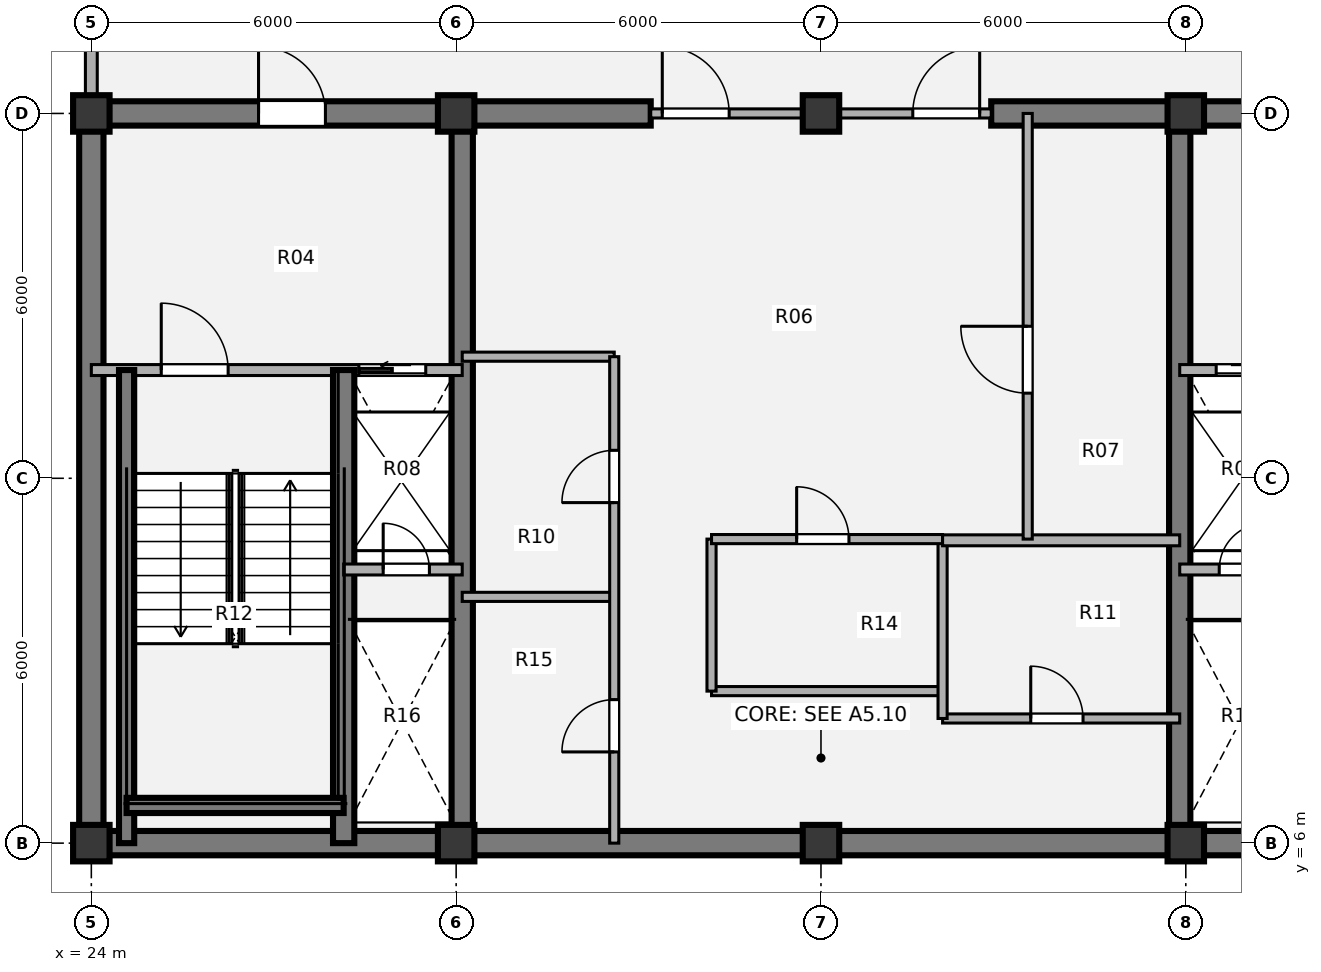
"""IFC4 building model, lengths in metres.
Left out: names, types, materials, properties, quantities, classifications, styles, units other than length and angle.
Written with IfcOpenShell. Run it as: python <this file> out.ifc"""

import sys

from ifc_helpers import new_model, si_unit, direction, frame, frame_2d, origin, origin_2d, place, context, subcontext, project, spatial, rectangle, extrude, source, transform, mapped, element, fill, save


model = new_model("IFC4")
c1 = context("Model", 3, precision=1e-05, world=origin(), true_north=direction((0.0, 1.0)))
c2 = subcontext(c1, "Body", "Model", "MODEL_VIEW")
j1 = project(units=[si_unit("LENGTHUNIT", "METRE"), si_unit("PLANEANGLEUNIT", "RADIAN")], contexts=[c1])
p1 = place(None, origin())
s1 = spatial("IfcSite", under=j1, at=p1, CompositionType="ELEMENT")
p2 = place(p1, origin())
s2 = spatial("IfcBuilding", under=s1, at=p2, CompositionType="ELEMENT")
p3 = place(p2, frame((0.0, 0.0, 311.76)))
s3 = spatial("IfcBuildingStorey", under=s2, at=p3, CompositionType="ELEMENT", Elevation=311.76)
m1 = source(origin(), c2, "Body", "SweptSolid", [
    extrude(rectangle(XDim=0.6, YDim=0.6, at=origin_2d()), origin(), (0.0, 0.0, 1.0), 3.96),
])
for number, where, z_axis, x_axis in (
    (1, (24.0, 6.0, 0.0), (0.0, 0.0, 1.0), (1.0, 0.0, 0.0)),
    (2, (30.0, 6.0, 0.0), (0.0, 0.0, 1.0), (1.0, 0.0, 0.0)),
    (3, (36.0, 6.0, 0.0), (0.0, 0.0, 1.0), (1.0, 0.0, 0.0)),
    (4, (42.0, 6.0, 0.0), (0.0, 0.0, 1.0), (1.0, 0.0, 0.0)),
    (5, (24.0, 18.0, 0.0), (0.0, 0.0, 1.0), (1.0, 0.0, 0.0)),
    (6, (30.0, 18.0, 0.0), (0.0, 0.0, 1.0), (1.0, 0.0, 0.0)),
    (7, (36.0, 18.0, 0.0), (0.0, 0.0, 1.0), (1.0, 0.0, 0.0)),
    (8, (42.0, 18.0, 0.0), (0.0, 0.0, 1.0), (1.0, 0.0, 0.0)),
):
    element("IfcColumn", number, at=place(p3, frame(where, z_axis=z_axis, x_axis=x_axis)), inside=s3, PredefinedType="COLUMN", context=c2, shape_type="MappedRepresentation", body=[
        mapped(m1, transform((0.0, 0.0, 0.0), x_axis=(1.0, 0.0, 0.0), y_axis=(0.0, 1.0, 0.0), z_axis=(0.0, 0.0, 1.0), scale=1.0)),
    ])
p4 = place(p3, frame((48.2, 6.0, 0.0), z_axis=(0.0, 0.0, 1.0), x_axis=(-1.0, 0.0, 0.0)))
e9 = element("IfcWall", 9, at=p4, inside=s3, PredefinedType="SHEAR", context=c2, shape_type="SweptSolid", body=[
    extrude(rectangle(XDim=24.4, YDim=0.4, at=frame_2d((12.2, 0.0))), origin(), (0.0, 0.0, 1.0), 3.96),
])
p5 = place(p3, frame((24.0, 6.0, 0.0), z_axis=(0.0, 0.0, 1.0), x_axis=(0.0, 1.0, 0.0)))
e10 = element("IfcWall", 10, at=p5, inside=s3, PredefinedType="SHEAR", context=c2, shape_type="SweptSolid", body=[
    extrude(rectangle(XDim=12.0, YDim=0.4, at=frame_2d((6.0, 0.0))), origin(), (0.0, 0.0, 1.0), 3.96),
])
p6 = place(p3, frame((23.8, 18.0, 0.0), z_axis=(0.0, 0.0, 1.0), x_axis=(1.0, 0.0, 0.0)))
e11 = element("IfcWall", 11, at=p6, inside=s3, PredefinedType="SHEAR", context=c2, shape_type="SweptSolid", body=[
    extrude(rectangle(XDim=9.4, YDim=0.4, at=frame_2d((4.7, 0.0))), origin(), (0.0, 0.0, 1.0), 3.96),
])
p7 = place(p6, frame((2.95, 0.0, 0.0)))
e12 = element("IfcOpeningElement", 12, at=p7, cuts=e11, PredefinedType="OPENING", context=c2, shape_type="SweptSolid", body=[
    extrude(rectangle(XDim=1.1, YDim=2.1, at=origin_2d()), frame((0.55, 0.21, 1.05), z_axis=(0.0, -1.0, 0.0), x_axis=(1.0, 0.0, 0.0)), (0.0, 0.0, 1.0), 0.42),
])
p8 = place(p3, frame((38.8, 18.0, 0.0), z_axis=(0.0, 0.0, 1.0), x_axis=(1.0, 0.0, 0.0)))
e13 = element("IfcWall", 13, at=p8, inside=s3, PredefinedType="SHEAR", context=c2, shape_type="SweptSolid", body=[
    extrude(rectangle(XDim=9.4, YDim=0.4, at=frame_2d((4.7, 0.0))), origin(), (0.0, 0.0, 1.0), 3.96),
])
p9 = place(p8, frame((5.45, 0.0, 0.0)))
e14 = element("IfcOpeningElement", 14, at=p9, cuts=e13, PredefinedType="OPENING", context=c2, shape_type="SweptSolid", body=[
    extrude(rectangle(XDim=1.1, YDim=2.1, at=origin_2d()), frame((0.55, 0.21, 1.05), z_axis=(0.0, -1.0, 0.0), x_axis=(1.0, 0.0, 0.0)), (0.0, 0.0, 1.0), 0.42),
])
for number, where, z_axis, x_axis in (
    (15, (30.1, 6.0, 0.0), (0.0, 0.0, 1.0), (0.0, 1.0, 0.0)),
    (16, (41.9, 18.0, 0.0), (0.0, 0.0, 1.0), (0.0, -1.0, 0.0)),
):
    element("IfcWall", number, at=place(p3, frame(where, z_axis=z_axis, x_axis=x_axis)), inside=s3, PredefinedType="SHEAR", context=c2, shape_type="SweptSolid", body=[
        extrude(rectangle(XDim=12.0, YDim=0.35, at=frame_2d((6.0, 0.0))), origin(), (0.0, 0.0, 1.0), 3.96),
    ])
p10 = place(p3, frame((24.0, 18.28, 0.0), z_axis=(0.0, 0.0, 1.0), x_axis=(0.0, 1.0, 0.0)))
e17 = element("IfcWall", 17, at=p10, inside=s3, PredefinedType="SOLIDWALL", context=c2, shape_type="SweptSolid", body=[
    extrude(rectangle(XDim=2.77, YDim=0.195, at=frame_2d((1.385, 0.0))), origin(), (0.0, 0.0, 1.0), 2.898),
])
p11 = place(p3, frame((30.1, 14.0, 0.0), z_axis=(0.0, 0.0, 1.0), x_axis=(1.0, 0.0, 0.0)))
e18 = element("IfcWall", 18, at=p11, inside=s3, PredefinedType="PARTITIONING", context=c2, shape_type="SweptSolid", body=[
    extrude(rectangle(XDim=2.5, YDim=0.15, at=frame_2d((1.25, 0.0))), origin(), (0.0, 0.0, 1.0), 3.68),
])
p12 = place(p3, frame((34.2, 8.5, 0.0), z_axis=(0.0, 0.0, 1.0), x_axis=(1.0, 0.0, 0.0)))
e19 = element("IfcWall", 19, at=p12, inside=s3, PredefinedType="PARTITIONING", context=c2, shape_type="SweptSolid", body=[
    extrude(rectangle(XDim=3.8, YDim=0.15, at=frame_2d((1.9, 0.0))), origin(), (0.0, 0.0, 1.0), 3.68),
])
p13 = place(p3, frame((38.0, 8.05, 0.0), z_axis=(0.0, 0.0, 1.0), x_axis=(1.0, 0.0, 0.0)))
e20 = element("IfcWall", 20, at=p13, inside=s3, PredefinedType="PARTITIONING", context=c2, shape_type="SweptSolid", body=[
    extrude(rectangle(XDim=3.9, YDim=0.15, at=frame_2d((1.95, 0.0))), origin(), (0.0, 0.0, 1.0), 3.68),
])
p14 = place(p13, frame((1.45, 0.0, 0.0)))
e21 = element("IfcOpeningElement", 21, at=p14, cuts=e20, PredefinedType="OPENING", context=c2, shape_type="SweptSolid", body=[
    extrude(rectangle(XDim=0.86, YDim=2.1, at=origin_2d()), frame((0.43, 0.085, 1.05), z_axis=(0.0, -1.0, 0.0), x_axis=(1.0, 0.0, 0.0)), (0.0, 0.0, 1.0), 0.17),
])
p15 = place(p3, frame((34.2, 8.5, 0.0), z_axis=(0.0, 0.0, 1.0), x_axis=(0.0, 1.0, 0.0)))
e22 = element("IfcWall", 22, at=p15, inside=s3, PredefinedType="PARTITIONING", context=c2, shape_type="SweptSolid", body=[
    extrude(rectangle(XDim=2.5, YDim=0.15, at=frame_2d((1.25, 0.0))), origin(), (0.0, 0.0, 1.0), 3.68),
])
p16 = place(p3, frame((38.0, 8.05, 0.0), z_axis=(0.0, 0.0, 1.0), x_axis=(0.0, 1.0, 0.0)))
e23 = element("IfcWall", 23, at=p16, inside=s3, PredefinedType="PARTITIONING", context=c2, shape_type="SweptSolid", body=[
    extrude(rectangle(XDim=2.95, YDim=0.15, at=frame_2d((1.475, 0.0))), origin(), (0.0, 0.0, 1.0), 3.68),
])
p17 = place(p3, frame((34.2, 11.0, 0.0), z_axis=(0.0, 0.0, 1.0), x_axis=(1.0, 0.0, 0.0)))
e24 = element("IfcWall", 24, at=p17, inside=s3, PredefinedType="PARTITIONING", context=c2, shape_type="SweptSolid", body=[
    extrude(rectangle(XDim=3.8, YDim=0.15, at=frame_2d((1.9, 0.0))), origin(), (0.0, 0.0, 1.0), 3.68),
])
p18 = place(p17, frame((1.4, 0.0, 0.0)))
e25 = element("IfcOpeningElement", 25, at=p18, cuts=e24, PredefinedType="OPENING", context=c2, shape_type="SweptSolid", body=[
    extrude(rectangle(XDim=0.86, YDim=2.1, at=origin_2d()), frame((0.43, 0.085, 1.05), z_axis=(0.0, -1.0, 0.0), x_axis=(1.0, 0.0, 0.0)), (0.0, 0.0, 1.0), 0.17),
])
p19 = place(p3, frame((38.0, 10.98, 0.0), z_axis=(0.0, 0.0, 1.0), x_axis=(1.0, 0.0, 0.0)))
e26 = element("IfcWall", 26, at=p19, inside=s3, PredefinedType="PARTITIONING", context=c2, shape_type="SweptSolid", body=[
    extrude(rectangle(XDim=3.9, YDim=0.18, at=frame_2d((1.95, 0.0))), origin(), (0.0, 0.0, 1.0), 3.68),
])
p20 = place(p3, frame((39.4, 11.0, 0.0), z_axis=(0.0, 0.0, 1.0), x_axis=(0.0, 1.0, 0.0)))
e27 = element("IfcWall", 27, at=p20, inside=s3, PredefinedType="PARTITIONING", context=c2, shape_type="SweptSolid", body=[
    extrude(rectangle(XDim=7.0, YDim=0.15, at=frame_2d((3.5, 0.0))), origin(), (0.0, 0.0, 1.0), 3.68),
])
p21 = place(p20, frame((2.4, 0.0, 0.0)))
e28 = element("IfcOpeningElement", 28, at=p21, cuts=e27, PredefinedType="OPENING", context=c2, shape_type="SweptSolid", body=[
    extrude(rectangle(XDim=1.1, YDim=2.1, at=origin_2d()), frame((0.55, 0.085, 1.05), z_axis=(0.0, -1.0, 0.0), x_axis=(1.0, 0.0, 0.0)), (0.0, 0.0, 1.0), 0.17),
])
p22 = place(p3, frame((30.1, 10.05, 0.0), z_axis=(0.0, 0.0, 1.0), x_axis=(1.0, 0.0, 0.0)))
e29 = element("IfcWall", 29, at=p22, inside=s3, PredefinedType="PARTITIONING", context=c2, shape_type="SweptSolid", body=[
    extrude(rectangle(XDim=2.5, YDim=0.15, at=frame_2d((1.25, 0.0))), origin(), (0.0, 0.0, 1.0), 3.68),
])
p23 = place(p3, frame((32.6, 6.0, 0.0), z_axis=(0.0, 0.0, 1.0), x_axis=(0.0, 1.0, 0.0)))
e30 = element("IfcWall", 30, at=p23, inside=s3, PredefinedType="PARTITIONING", context=c2, shape_type="SweptSolid", body=[
    extrude(rectangle(XDim=8.0, YDim=0.15, at=frame_2d((4.0, 0.0))), origin(), (0.0, 0.0, 1.0), 3.68),
])
p24 = place(p23, frame((1.5, 0.0, 0.0)))
e31 = element("IfcOpeningElement", 31, at=p24, cuts=e30, PredefinedType="OPENING", context=c2, shape_type="SweptSolid", body=[
    extrude(rectangle(XDim=0.86, YDim=2.1, at=origin_2d()), frame((0.43, 0.085, 1.05), z_axis=(0.0, -1.0, 0.0), x_axis=(1.0, 0.0, 0.0)), (0.0, 0.0, 1.0), 0.17),
])
p25 = place(p23, frame((5.6, 0.0, 0.0)))
e32 = element("IfcOpeningElement", 32, at=p25, cuts=e30, PredefinedType="OPENING", context=c2, shape_type="SweptSolid", body=[
    extrude(rectangle(XDim=0.86, YDim=2.1, at=origin_2d()), frame((0.43, 0.085, 1.05), z_axis=(0.0, -1.0, 0.0), x_axis=(1.0, 0.0, 0.0)), (0.0, 0.0, 1.0), 0.17),
])
p26 = place(p3, frame((33.2, 18.0, 0.0), z_axis=(0.0, 0.0, 1.0), x_axis=(1.0, 0.0, 0.0)))
e33 = element("IfcWall", 33, at=p26, inside=s3, PredefinedType="PARTITIONING", context=c2, shape_type="SweptSolid", body=[
    extrude(rectangle(XDim=5.6, YDim=0.15, at=frame_2d((2.8, 0.0))), origin(), (0.0, 0.0, 1.0), 2.695),
])
p27 = place(p26, frame((0.19, 0.0, 0.0)))
e34 = element("IfcOpeningElement", 34, at=p27, cuts=e33, PredefinedType="OPENING", context=c2, shape_type="SweptSolid", body=[
    extrude(rectangle(XDim=1.1, YDim=2.1, at=origin_2d()), frame((0.55, 0.085, 1.05), z_axis=(0.0, -1.0, 0.0), x_axis=(1.0, 0.0, 0.0)), (0.0, 0.0, 1.0), 0.17),
])
p28 = place(p26, frame((4.31, 0.0, 0.0)))
e35 = element("IfcOpeningElement", 35, at=p28, cuts=e33, PredefinedType="OPENING", context=c2, shape_type="SweptSolid", body=[
    extrude(rectangle(XDim=1.1, YDim=2.1, at=origin_2d()), frame((0.55, 0.085, 1.05), z_axis=(0.0, -1.0, 0.0), x_axis=(1.0, 0.0, 0.0)), (0.0, 0.0, 1.0), 0.17),
])
p29 = place(p3, frame((24.0, 13.78, 0.0), z_axis=(0.0, 0.0, 1.0), x_axis=(1.0, 0.0, 0.0)))
e36 = element("IfcWall", 36, at=p29, inside=s3, PredefinedType="PARTITIONING", context=c2, shape_type="SweptSolid", body=[
    extrude(rectangle(XDim=6.1, YDim=0.18, at=frame_2d((3.05, 0.0))), origin(), (0.0, 0.0, 1.0), 3.68),
])
p30 = place(p29, frame((1.15, 0.0, 0.0)))
e37 = element("IfcOpeningElement", 37, at=p30, cuts=e36, PredefinedType="OPENING", context=c2, shape_type="SweptSolid", body=[
    extrude(rectangle(XDim=1.1, YDim=2.1, at=origin_2d()), frame((0.55, 0.1, 1.05), z_axis=(0.0, -1.0, 0.0), x_axis=(1.0, 0.0, 0.0)), (0.0, 0.0, 1.0), 0.2),
])
p31 = place(p29, frame((4.4, 0.0, 0.0)))
e38 = element("IfcOpeningElement", 38, at=p31, cuts=e36, PredefinedType="OPENING", context=c2, shape_type="SweptSolid", body=[
    extrude(rectangle(XDim=1.1, YDim=2.1, at=origin_2d()), frame((0.55, 0.1, 1.05), z_axis=(0.0, -1.0, 0.0), x_axis=(1.0, 0.0, 0.0)), (0.0, 0.0, 1.0), 0.2),
])
p32 = place(p3, frame((28.15, 6.0, 0.0), z_axis=(0.0, 0.0, 1.0), x_axis=(0.0, 1.0, 0.0)))
e39 = element("IfcWall", 39, at=p32, inside=s3, PredefinedType="SHEAR", context=c2, shape_type="SweptSolid", body=[
    extrude(rectangle(XDim=7.78, YDim=0.35, at=frame_2d((3.89, 0.0))), origin(), (0.0, 0.0, 1.0), 4.03),
])
p33 = place(p3, frame((24.58, 6.0, 0.0), z_axis=(0.0, 0.0, 1.0), x_axis=(0.0, 1.0, 0.0)))
e40 = element("IfcWall", 40, at=p33, inside=s3, PredefinedType="SHEAR", context=c2, shape_type="SweptSolid", body=[
    extrude(rectangle(XDim=7.78, YDim=0.25, at=frame_2d((3.89, 0.0))), origin(), (0.0, 0.0, 1.0), 4.03),
])
p34 = place(p3, frame((24.58, 6.62, 0.0), z_axis=(0.0, 0.0, 1.0), x_axis=(1.0, 0.0, 0.0)))
e41 = element("IfcWall", 41, at=p34, inside=s3, PredefinedType="SHEAR", context=c2, shape_type="SweptSolid", body=[
    extrude(rectangle(XDim=3.57, YDim=0.25, at=frame_2d((1.785, 0.0))), origin(), (0.0, 0.0, 1.0), 4.03),
])
p35 = place(p3, frame((28.15, 10.5, 0.0), z_axis=(0.0, 0.0, 1.0), x_axis=(1.0, 0.0, 0.0)))
e42 = element("IfcWall", 42, at=p35, inside=s3, PredefinedType="PARTITIONING", context=c2, shape_type="SweptSolid", body=[
    extrude(rectangle(XDim=1.95, YDim=0.18, at=frame_2d((0.975, 0.0))), origin(), (0.0, 0.0, 1.0), 3.68),
])
p36 = place(p35, frame((0.65, 0.0, 0.0)))
e43 = element("IfcOpeningElement", 43, at=p36, cuts=e42, PredefinedType="OPENING", context=c2, shape_type="SweptSolid", body=[
    extrude(rectangle(XDim=0.76, YDim=2.05, at=origin_2d()), frame((0.38, 0.1, 1.025), z_axis=(0.0, -1.0, 0.0), x_axis=(1.0, 0.0, 0.0)), (0.0, 0.0, 1.0), 0.2),
])
p37 = place(p3, frame((41.9, 13.78, 0.0), z_axis=(0.0, 0.0, 1.0), x_axis=(1.0, 0.0, 0.0)))
e44 = element("IfcWall", 44, at=p37, inside=s3, PredefinedType="PARTITIONING", context=c2, shape_type="SweptSolid", body=[
    extrude(rectangle(XDim=6.1, YDim=0.18, at=frame_2d((3.05, 0.0))), origin(), (0.0, 0.0, 1.0), 3.68),
])
p38 = place(p37, frame((0.6, 0.0, 0.0)))
e45 = element("IfcOpeningElement", 45, at=p38, cuts=e44, PredefinedType="OPENING", context=c2, shape_type="SweptSolid", body=[
    extrude(rectangle(XDim=1.1, YDim=2.1, at=origin_2d()), frame((0.55, 0.1, 1.05), z_axis=(0.0, -1.0, 0.0), x_axis=(1.0, 0.0, 0.0)), (0.0, 0.0, 1.0), 0.2),
])
p39 = place(p37, frame((3.8, 0.0, 0.0)))
e46 = element("IfcOpeningElement", 46, at=p39, cuts=e44, PredefinedType="OPENING", context=c2, shape_type="SweptSolid", body=[
    extrude(rectangle(XDim=1.1, YDim=2.1, at=origin_2d()), frame((0.55, 0.1, 1.05), z_axis=(0.0, -1.0, 0.0), x_axis=(1.0, 0.0, 0.0)), (0.0, 0.0, 1.0), 0.2),
])
p40 = place(p3, frame((41.9, 10.5, 0.0), z_axis=(0.0, 0.0, 1.0), x_axis=(1.0, 0.0, 0.0)))
e47 = element("IfcWall", 47, at=p40, inside=s3, PredefinedType="PARTITIONING", context=c2, shape_type="SweptSolid", body=[
    extrude(rectangle(XDim=1.95, YDim=0.18, at=frame_2d((0.975, 0.0))), origin(), (0.0, 0.0, 1.0), 3.68),
])
p41 = place(p40, frame((0.65, 0.0, 0.0)))
e48 = element("IfcOpeningElement", 48, at=p41, cuts=e47, PredefinedType="OPENING", context=c2, shape_type="SweptSolid", body=[
    extrude(rectangle(XDim=0.76, YDim=2.05, at=origin_2d()), frame((0.38, 0.1, 1.025), z_axis=(0.0, -1.0, 0.0), x_axis=(1.0, 0.0, 0.0)), (0.0, 0.0, 1.0), 0.2),
])
m2 = source(origin(), c2, "Body", "SweptSolid", [
    extrude(rectangle(XDim=0.86, YDim=2.1, at=origin_2d()), frame((0.43, 0.025, 1.05), z_axis=(0.0, -1.0, 0.0), x_axis=(1.0, 0.0, 0.0)), (0.0, 0.0, 1.0), 0.05),
])
p42 = place(p14, origin())
e49 = element("IfcDoor", 49, at=p42, inside=s3, OperationType="SINGLE_SWING_LEFT", PredefinedType="DOOR", context=c2, shape_type="MappedRepresentation", body=[
    mapped(m2, transform((0.0, 0.0, 0.0), x_axis=(1.0, 0.0, 0.0), y_axis=(0.0, 1.0, 0.0), z_axis=(0.0, 0.0, 1.0), scale=1.0)),
])
fill(e21, e49)
p43 = place(p18, origin())
e50 = element("IfcDoor", 50, at=p43, inside=s3, OperationType="SINGLE_SWING_LEFT", PredefinedType="DOOR", context=c2, shape_type="MappedRepresentation", body=[
    mapped(m2, transform((0.0, 0.0, 0.0), x_axis=(1.0, 0.0, 0.0), y_axis=(0.0, 1.0, 0.0), z_axis=(0.0, 0.0, 1.0), scale=1.0)),
])
fill(e25, e50)
m3 = source(origin(), c2, "Body", "SweptSolid", [
    extrude(rectangle(XDim=1.1, YDim=2.1, at=origin_2d()), frame((0.55, 0.025, 1.05), z_axis=(0.0, -1.0, 0.0), x_axis=(1.0, 0.0, 0.0)), (0.0, 0.0, 1.0), 0.05),
])
p44 = place(p21, origin())
e51 = element("IfcDoor", 51, at=p44, inside=s3, OperationType="SINGLE_SWING_RIGHT", PredefinedType="DOOR", context=c2, shape_type="MappedRepresentation", body=[
    mapped(m3, transform((0.0, 0.0, 0.0), x_axis=(1.0, 0.0, 0.0), y_axis=(0.0, 1.0, 0.0), z_axis=(0.0, 0.0, 1.0), scale=1.0)),
])
fill(e28, e51)
p45 = place(p24, origin())
e52 = element("IfcDoor", 52, at=p45, inside=s3, OperationType="SINGLE_SWING_LEFT", PredefinedType="DOOR", context=c2, shape_type="MappedRepresentation", body=[
    mapped(m2, transform((0.0, 0.0, 0.0), x_axis=(1.0, 0.0, 0.0), y_axis=(0.0, 1.0, 0.0), z_axis=(0.0, 0.0, 1.0), scale=1.0)),
])
fill(e31, e52)
p46 = place(p25, origin())
e53 = element("IfcDoor", 53, at=p46, inside=s3, OperationType="SINGLE_SWING_LEFT", PredefinedType="DOOR", context=c2, shape_type="MappedRepresentation", body=[
    mapped(m2, transform((0.0, 0.0, 0.0), x_axis=(1.0, 0.0, 0.0), y_axis=(0.0, 1.0, 0.0), z_axis=(0.0, 0.0, 1.0), scale=1.0)),
])
fill(e32, e53)
m4 = source(origin(), c2, "Body", "SweptSolid", [
    extrude(rectangle(XDim=1.1, YDim=2.1, at=origin_2d()), frame((0.55, 0.025, 1.05), z_axis=(0.0, -1.0, 0.0), x_axis=(1.0, 0.0, 0.0)), (0.0, 0.0, 1.0), 0.05),
])
p47 = place(p27, origin())
e54 = element("IfcDoor", 54, at=p47, inside=s3, OperationType="SINGLE_SWING_LEFT", PredefinedType="DOOR", context=c2, shape_type="MappedRepresentation", body=[
    mapped(m4, transform((0.0, 0.0, 0.0), x_axis=(1.0, 0.0, 0.0), y_axis=(0.0, 1.0, 0.0), z_axis=(0.0, 0.0, 1.0), scale=1.0)),
])
fill(e34, e54)
p48 = place(p28, origin())
e55 = element("IfcDoor", 55, at=p48, inside=s3, OperationType="SINGLE_SWING_RIGHT", PredefinedType="DOOR", context=c2, shape_type="MappedRepresentation", body=[
    mapped(m4, transform((0.0, 0.0, 0.0), x_axis=(1.0, 0.0, 0.0), y_axis=(0.0, 1.0, 0.0), z_axis=(0.0, 0.0, 1.0), scale=1.0)),
])
fill(e35, e55)
m5 = source(origin(), c2, "Body", "SweptSolid", [
    extrude(rectangle(XDim=1.1, YDim=2.1, at=origin_2d()), frame((0.55, 0.025, 1.05), z_axis=(0.0, -1.0, 0.0), x_axis=(1.0, 0.0, 0.0)), (0.0, 0.0, 1.0), 0.05),
])
p49 = place(p30, origin())
e56 = element("IfcDoor", 56, at=p49, inside=s3, OperationType="SINGLE_SWING_LEFT", PredefinedType="DOOR", context=c2, shape_type="MappedRepresentation", body=[
    mapped(m5, transform((0.0, 0.0, 0.0), x_axis=(1.0, 0.0, 0.0), y_axis=(0.0, 1.0, 0.0), z_axis=(0.0, 0.0, 1.0), scale=1.0)),
])
fill(e37, e56)
m6 = source(origin(), c2, "Body", "SweptSolid", [
    extrude(rectangle(XDim=1.1, YDim=2.1, at=origin_2d()), frame((0.55, 0.025, 1.05), z_axis=(0.0, -1.0, 0.0), x_axis=(1.0, 0.0, 0.0)), (0.0, 0.0, 1.0), 0.05),
])
p50 = place(p31, origin())
e57 = element("IfcDoor", 57, at=p50, inside=s3, OperationType="SLIDING_TO_LEFT", PredefinedType="DOOR", context=c2, shape_type="MappedRepresentation", body=[
    mapped(m6, transform((0.0, 0.0, 0.0), x_axis=(1.0, 0.0, 0.0), y_axis=(0.0, 1.0, 0.0), z_axis=(0.0, 0.0, 1.0), scale=1.0)),
])
fill(e38, e57)
m7 = source(origin(), c2, "Body", "SweptSolid", [
    extrude(rectangle(XDim=0.76, YDim=2.05, at=origin_2d()), frame((0.38, 0.025, 1.025), z_axis=(0.0, -1.0, 0.0), x_axis=(1.0, 0.0, 0.0)), (0.0, 0.0, 1.0), 0.05),
])
p51 = place(p36, origin())
e58 = element("IfcDoor", 58, at=p51, inside=s3, OperationType="SINGLE_SWING_LEFT", PredefinedType="DOOR", context=c2, shape_type="MappedRepresentation", body=[
    mapped(m7, transform((0.0, 0.0, 0.0), x_axis=(1.0, 0.0, 0.0), y_axis=(0.0, 1.0, 0.0), z_axis=(0.0, 0.0, 1.0), scale=1.0)),
])
fill(e43, e58)
p52 = place(p38, origin())
e59 = element("IfcDoor", 59, at=p52, inside=s3, OperationType="SLIDING_TO_RIGHT", PredefinedType="DOOR", context=c2, shape_type="MappedRepresentation", body=[
    mapped(m6, transform((0.0, 0.0, 0.0), x_axis=(1.0, 0.0, 0.0), y_axis=(0.0, 1.0, 0.0), z_axis=(0.0, 0.0, 1.0), scale=1.0)),
])
fill(e45, e59)
p53 = place(p41, origin())
e60 = element("IfcDoor", 60, at=p53, inside=s3, OperationType="SINGLE_SWING_RIGHT", PredefinedType="DOOR", context=c2, shape_type="MappedRepresentation", body=[
    mapped(m7, transform((0.0, 0.0, 0.0), x_axis=(1.0, 0.0, 0.0), y_axis=(0.0, 1.0, 0.0), z_axis=(0.0, 0.0, 1.0), scale=1.0)),
])
fill(e48, e60)
p54 = place(p7, origin())
e61 = element("IfcDoor", 61, at=p54, inside=s3, OperationType="SINGLE_SWING_LEFT", PredefinedType="DOOR", context=c2, shape_type="MappedRepresentation", body=[
    mapped(m4, transform((0.0, 0.0, 0.0), x_axis=(1.0, 0.0, 0.0), y_axis=(0.0, 1.0, 0.0), z_axis=(0.0, 0.0, 1.0), scale=1.0)),
])
fill(e12, e61)
save(model, sys.argv[1])
